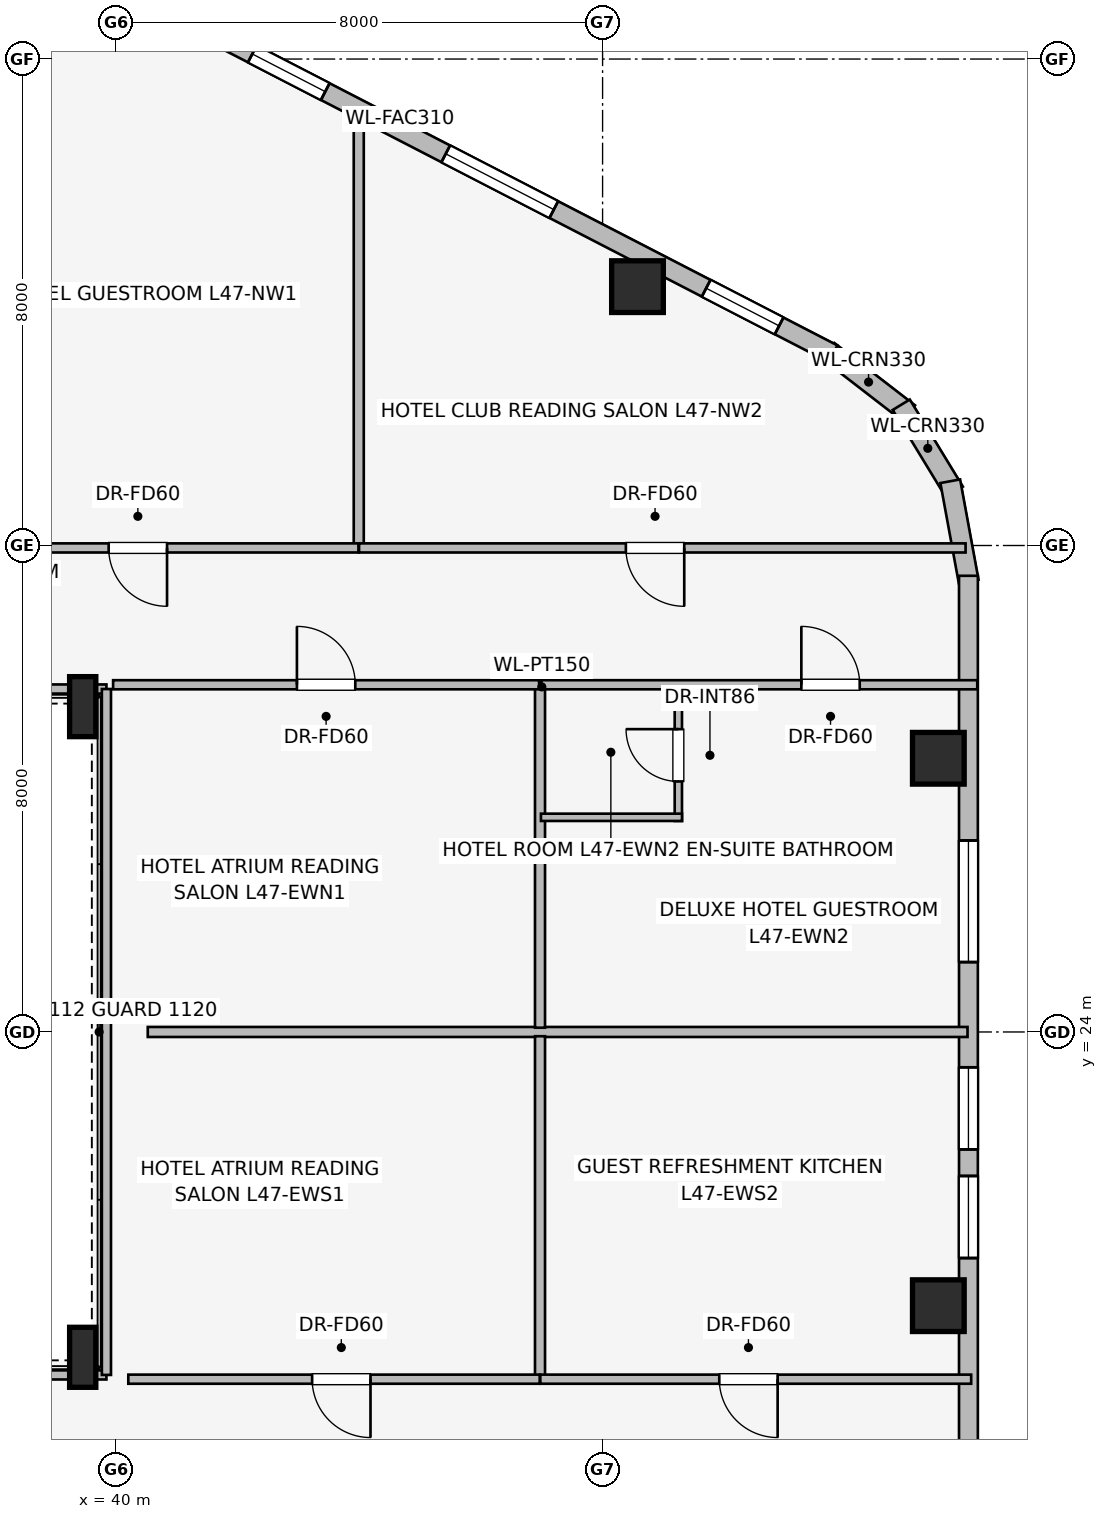
"""IFC4 building model, lengths in metres.
Left out: names, types, materials, properties, quantities, classifications, styles, units other than length and angle.
Written with IfcOpenShell. Run it as: python <this file> out.ifc"""

import sys

from ifc_helpers import new_model, si_unit, direction, frame, frame_2d, origin, origin_2d, place, context, subcontext, project, spatial, rectangle, i_section, extrude, element, fill, save


model = new_model("IFC4")
c1 = context("Model", 3, precision=1e-05, world=origin(), true_north=direction((0.0, 1.0)))
c2 = subcontext(c1, "Body", "Model", "MODEL_VIEW")
j1 = project(units=[si_unit("LENGTHUNIT", "METRE"), si_unit("PLANEANGLEUNIT", "RADIAN")], contexts=[c1])
p1 = place(None, origin())
s1 = spatial("IfcSite", under=j1, at=p1, CompositionType="ELEMENT")
p2 = place(p1, origin())
s2 = spatial("IfcBuilding", under=s1, at=p2, CompositionType="ELEMENT")
p3 = place(p2, frame((0.0, 0.0, 174.0)))
s3 = spatial("IfcBuildingStorey", under=s2, at=p3, CompositionType="ELEMENT", Elevation=174.0)
for number, where, z_axis, x_axis in (
    (1, (48.574, 36.257, 0.0), (0.0, 0.0, 1.0), (1.0, 0.0, 0.0)),
    (2, (53.522, 19.499, 0.0), (0.0, 0.0, 1.0), (1.0, 0.0, 0.0)),
    (3, (53.522, 28.501, 0.0), (0.0, 0.0, 1.0), (1.0, 0.0, 0.0)),
):
    element("IfcColumn", number, at=place(p3, frame(where, z_axis=z_axis, x_axis=x_axis)), inside=s3, PredefinedType="COLUMN", context=c2, shape_type="SweptSolid", body=[
        extrude(rectangle(XDim=0.85, YDim=0.85, at=origin_2d()), origin(), (0.0, 0.0, 1.0), 3.45),
    ])
for number, where, z_axis, x_axis in (
    (4, (39.45, 18.65, 0.0), (0.0, 0.0, 1.0), (1.0, 0.0, 0.0)),
    (5, (39.45, 29.35, 0.0), (0.0, 0.0, 1.0), (1.0, 0.0, 0.0)),
):
    element("IfcColumn", number, at=place(p3, frame(where, z_axis=z_axis, x_axis=x_axis)), inside=s3, PredefinedType="COLUMN", context=c2, shape_type="SweptSolid", body=[
        extrude(i_section(OverallWidth=0.431, OverallDepth=0.987, WebThickness=0.034, FlangeThickness=0.062, at=origin_2d()), origin(), (0.0, 0.0, 1.0), 3.45),
    ])
p4 = place(p3, frame((51.711, 35.2, 0.0), z_axis=(0.0, 0.0, 1.0), x_axis=(0.791464279355, -0.611215423976, 0.0)))
e6 = element("IfcWall", 6, at=p4, inside=s3, PredefinedType="STANDARD", context=c2, shape_type="SweptSolid", body=[
    extrude(rectangle(XDim=1.677, YDim=0.33, at=frame_2d((0.838, 0.0))), origin(), (0.0, 0.0, 1.0), 3.16),
])
p5 = place(p3, frame((52.912, 34.315, 0.0), z_axis=(0.0, 0.0, 1.0), x_axis=(0.520219286058, -0.85403272444, 0.0)))
e7 = element("IfcWall", 7, at=p5, inside=s3, PredefinedType="STANDARD", context=c2, shape_type="SweptSolid", body=[
    extrude(rectangle(XDim=1.678, YDim=0.33, at=frame_2d((0.839, 0.0))), origin(), (0.0, 0.0, 1.0), 3.16),
])
p6 = place(p3, frame((53.718, 33.057, 0.0), z_axis=(0.0, 0.0, 1.0), x_axis=(0.180717642671, -0.983535019014, 0.0)))
e8 = element("IfcWall", 8, at=p6, inside=s3, PredefinedType="STANDARD", context=c2, shape_type="SweptSolid", body=[
    extrude(rectangle(XDim=1.677, YDim=0.33, at=frame_2d((0.838, 0.0))), origin(), (0.0, 0.0, 1.0), 3.16),
])
p7 = place(p3, frame((36.838, 42.871, 0.0), z_axis=(0.0, 0.0, 1.0), x_axis=(0.888626188278, -0.458632202867, 0.0)))
e9 = element("IfcWall", 9, at=p7, inside=s3, PredefinedType="STANDARD", context=c2, shape_type="SweptSolid", body=[
    extrude(rectangle(XDim=16.828, YDim=0.31, at=frame_2d((8.414, 0.0))), origin(), (0.0, 0.0, 1.0), 3.16),
])
p8 = place(p7, frame((0.675, 0.0, 0.75)))
e10 = element("IfcOpeningElement", 10, at=p8, cuts=e9, PredefinedType="OPENING", context=c2, shape_type="SweptSolid", body=[
    extrude(rectangle(XDim=2.0, YDim=1.5, at=frame_2d((1.0, 0.75))), frame((0.0, 0.165, 0.0), z_axis=(0.0, -1.0, 0.0), x_axis=(1.0, 0.0, 0.0)), (0.0, 0.0, 1.0), 0.33),
])
p9 = place(p7, frame((4.196, 0.0, 0.75)))
e11 = element("IfcOpeningElement", 11, at=p9, cuts=e9, PredefinedType="OPENING", context=c2, shape_type="SweptSolid", body=[
    extrude(rectangle(XDim=1.35, YDim=1.45, at=frame_2d((0.675, 0.725))), frame((0.0, 0.165, 0.0), z_axis=(0.0, -1.0, 0.0), x_axis=(1.0, 0.0, 0.0)), (0.0, 0.0, 1.0), 0.33),
])
p10 = place(p7, frame((6.078, 0.0, 0.75)))
e12 = element("IfcOpeningElement", 12, at=p10, cuts=e9, PredefinedType="OPENING", context=c2, shape_type="SweptSolid", body=[
    extrude(rectangle(XDim=1.35, YDim=1.45, at=frame_2d((0.675, 0.725))), frame((0.0, 0.165, 0.0), z_axis=(0.0, -1.0, 0.0), x_axis=(1.0, 0.0, 0.0)), (0.0, 0.0, 1.0), 0.33),
])
p11 = place(p7, frame((9.658, 0.0, 0.75)))
e13 = element("IfcOpeningElement", 13, at=p11, cuts=e9, PredefinedType="OPENING", context=c2, shape_type="SweptSolid", body=[
    extrude(rectangle(XDim=2.0, YDim=1.5, at=frame_2d((1.0, 0.75))), frame((0.0, 0.165, 0.0), z_axis=(0.0, -1.0, 0.0), x_axis=(1.0, 0.0, 0.0)), (0.0, 0.0, 1.0), 0.33),
])
p12 = place(p7, frame((14.478, 0.0, 0.75)))
e14 = element("IfcOpeningElement", 14, at=p12, cuts=e9, PredefinedType="OPENING", context=c2, shape_type="SweptSolid", body=[
    extrude(rectangle(XDim=1.35, YDim=1.45, at=frame_2d((0.675, 0.725))), frame((0.0, 0.165, 0.0), z_axis=(0.0, -1.0, 0.0), x_axis=(1.0, 0.0, 0.0)), (0.0, 0.0, 1.0), 0.33),
])
p13 = place(p3, frame((54.017, 31.502, 0.0), z_axis=(0.0, 0.0, 1.0), x_axis=(0.0, -1.0, 0.0)))
e15 = element("IfcWall", 15, at=p13, inside=s3, PredefinedType="STANDARD", context=c2, shape_type="SweptSolid", body=[
    extrude(rectangle(XDim=15.004, YDim=0.31, at=frame_2d((7.502, 0.0))), origin(), (0.0, 0.0, 1.0), 3.16),
])
p14 = place(p13, frame((4.353, 0.0, 0.75)))
e16 = element("IfcOpeningElement", 16, at=p14, cuts=e15, PredefinedType="OPENING", context=c2, shape_type="SweptSolid", body=[
    extrude(rectangle(XDim=2.0, YDim=1.5, at=frame_2d((1.0, 0.75))), frame((0.0, 0.165, 0.0), z_axis=(0.0, -1.0, 0.0), x_axis=(1.0, 0.0, 0.0)), (0.0, 0.0, 1.0), 0.33),
])
p15 = place(p13, frame((8.083, 0.0, 0.75)))
e17 = element("IfcOpeningElement", 17, at=p15, cuts=e15, PredefinedType="OPENING", context=c2, shape_type="SweptSolid", body=[
    extrude(rectangle(XDim=1.35, YDim=1.45, at=frame_2d((0.675, 0.725))), frame((0.0, 0.165, 0.0), z_axis=(0.0, -1.0, 0.0), x_axis=(1.0, 0.0, 0.0)), (0.0, 0.0, 1.0), 0.33),
])
p16 = place(p13, frame((9.87, 0.0, 0.75)))
e18 = element("IfcOpeningElement", 18, at=p16, cuts=e15, PredefinedType="OPENING", context=c2, shape_type="SweptSolid", body=[
    extrude(rectangle(XDim=1.35, YDim=1.45, at=frame_2d((0.675, 0.725))), frame((0.0, 0.165, 0.0), z_axis=(0.0, -1.0, 0.0), x_axis=(1.0, 0.0, 0.0)), (0.0, 0.0, 1.0), 0.33),
])
p17 = place(p3, frame((27.675, 18.36, 0.0), z_axis=(0.0, 0.0, 1.0), x_axis=(1.0, 0.0, 0.0)))
e19 = element("IfcWall", 19, at=p17, inside=s3, PredefinedType="PARTITIONING", context=c2, shape_type="SweptSolid", body=[
    extrude(rectangle(XDim=12.165, YDim=0.15, at=frame_2d((6.083, 0.0))), origin(), (0.0, 0.0, 1.0), 2.301),
])
p18 = place(p3, frame((39.84, 29.64, 0.0), z_axis=(0.0, 0.0, 1.0), x_axis=(-1.0, 0.0, 0.0)))
e20 = element("IfcWall", 20, at=p18, inside=s3, PredefinedType="PARTITIONING", context=c2, shape_type="SweptSolid", body=[
    extrude(rectangle(XDim=12.2, YDim=0.15, at=frame_2d((6.1, 0.0))), origin(), (0.0, 0.0, 1.0), 2.301),
])
p19 = place(p3, frame((39.84, 18.36, 0.0), z_axis=(0.0, 0.0, 1.0), x_axis=(0.0, 1.0, 0.0)))
e21 = element("IfcWall", 21, at=p19, inside=s3, PredefinedType="PARTITIONING", context=c2, shape_type="SweptSolid", body=[
    extrude(rectangle(XDim=11.28, YDim=0.15, at=frame_2d((5.64, 0.0))), origin(), (0.0, 0.0, 1.0), 3.16),
])
p20 = place(p3, frame((43.99, 31.97, 0.0), z_axis=(0.0, 0.0, 1.0), x_axis=(0.0, 1.0, 0.0)))
e22 = element("IfcWall", 22, at=p20, inside=s3, PredefinedType="PARTITIONING", context=c2, shape_type="SweptSolid", body=[
    extrude(rectangle(XDim=7.193, YDim=0.165, at=frame_2d((3.597, 0.0))), origin(), (0.0, 0.0, 1.0), 3.16),
])
p21 = place(p3, frame((43.985, 31.96, 0.0), z_axis=(0.0, 0.0, 1.0), x_axis=(-1.0, 0.0, 0.0)))
e23 = element("IfcWall", 23, at=p21, inside=s3, PredefinedType="PARTITIONING", context=c2, shape_type="SweptSolid", body=[
    extrude(rectangle(XDim=9.695, YDim=0.15, at=frame_2d((4.848, 0.0))), origin(), (0.0, 0.0, 1.0), 3.16),
])
p22 = place(p21, frame((3.148, 0.0, 0.0)))
e24 = element("IfcOpeningElement", 24, at=p22, cuts=e23, PredefinedType="OPENING", context=c2, shape_type="SweptSolid", body=[
    extrude(rectangle(XDim=0.96, YDim=2.0, at=frame_2d((0.48, 1.0))), frame((0.0, 0.085, 0.0), z_axis=(0.0, -1.0, 0.0), x_axis=(1.0, 0.0, 0.0)), (0.0, 0.0, 1.0), 0.17),
])
p23 = place(p3, frame((53.97, 31.96, 0.0), z_axis=(0.0, 0.0, 1.0), x_axis=(-1.0, 0.0, 0.0)))
e25 = element("IfcWall", 25, at=p23, inside=s3, PredefinedType="PARTITIONING", context=c2, shape_type="SweptSolid", body=[
    extrude(rectangle(XDim=9.975, YDim=0.15, at=frame_2d((4.987, 0.0))), origin(), (0.0, 0.0, 1.0), 3.16),
])
p24 = place(p23, frame((4.627, 0.0, 0.0)))
e26 = element("IfcOpeningElement", 26, at=p24, cuts=e25, PredefinedType="OPENING", context=c2, shape_type="SweptSolid", body=[
    extrude(rectangle(XDim=0.96, YDim=2.0, at=frame_2d((0.48, 1.0))), frame((0.0, 0.085, 0.0), z_axis=(0.0, -1.0, 0.0), x_axis=(1.0, 0.0, 0.0)), (0.0, 0.0, 1.0), 0.17),
])
p25 = place(p3, frame((40.52, 24.0, 0.0), z_axis=(0.0, 0.0, 1.0), x_axis=(1.0, 0.0, 0.0)))
e27 = element("IfcWall", 27, at=p25, inside=s3, PredefinedType="PARTITIONING", context=c2, shape_type="SweptSolid", body=[
    extrude(rectangle(XDim=13.482, YDim=0.165, at=frame_2d((6.741, 0.0))), origin(), (0.0, 0.0, 1.0), 3.16),
])
p26 = place(p3, frame((46.971, 24.07, 0.0), z_axis=(0.0, 0.0, 1.0), x_axis=(0.0, 1.0, 0.0)))
e28 = element("IfcWall", 28, at=p26, inside=s3, PredefinedType="PARTITIONING", context=c2, shape_type="SweptSolid", body=[
    extrude(rectangle(XDim=5.64, YDim=0.165, at=frame_2d((2.82, 0.0))), origin(), (0.0, 0.0, 1.0), 2.703),
])
p27 = place(p3, frame((39.95, 29.71, 0.0), z_axis=(0.0, 0.0, 1.0), x_axis=(1.0, 0.0, 0.0)))
e29 = element("IfcWall", 29, at=p27, inside=s3, PredefinedType="PARTITIONING", context=c2, shape_type="SweptSolid", body=[
    extrude(rectangle(XDim=7.006, YDim=0.15, at=frame_2d((3.503, 0.0))), origin(), (0.0, 0.0, 1.0), 3.16),
])
p28 = place(p27, frame((3.023, 0.0, 0.0)))
e30 = element("IfcOpeningElement", 30, at=p28, cuts=e29, PredefinedType="OPENING", context=c2, shape_type="SweptSolid", body=[
    extrude(rectangle(XDim=0.96, YDim=2.0, at=frame_2d((0.48, 1.0))), frame((0.0, 0.085, 0.0), z_axis=(0.0, -1.0, 0.0), x_axis=(1.0, 0.0, 0.0)), (0.0, 0.0, 1.0), 0.17),
])
p29 = place(p3, frame((49.246, 27.47, 0.0), z_axis=(0.0, 0.0, 1.0), x_axis=(0.0, 1.0, 0.0)))
e31 = element("IfcWall", 31, at=p29, inside=s3, PredefinedType="PARTITIONING", context=c2, shape_type="SweptSolid", body=[
    extrude(rectangle(XDim=2.24, YDim=0.12, at=frame_2d((1.12, 0.0))), origin(), (0.0, 0.0, 1.0), 3.16),
])
p30 = place(p29, frame((0.65, 0.0, 0.0)))
e32 = element("IfcOpeningElement", 32, at=p30, cuts=e31, PredefinedType="OPENING", context=c2, shape_type="SweptSolid", body=[
    extrude(rectangle(XDim=0.86, YDim=2.0, at=frame_2d((0.43, 1.0))), frame((0.0, 0.07, 0.0), z_axis=(0.0, -1.0, 0.0), x_axis=(1.0, 0.0, 0.0)), (0.0, 0.0, 1.0), 0.14),
])
p31 = place(p3, frame((46.986, 27.53, 0.0), z_axis=(0.0, 0.0, 1.0), x_axis=(1.0, 0.0, 0.0)))
e33 = element("IfcWall", 33, at=p31, inside=s3, PredefinedType="PARTITIONING", context=c2, shape_type="SweptSolid", body=[
    extrude(rectangle(XDim=2.32, YDim=0.12, at=frame_2d((1.16, 0.0))), origin(), (0.0, 0.0, 1.0), 3.16),
])
p32 = place(p3, frame((46.986, 29.71, 0.0), z_axis=(0.0, 0.0, 1.0), x_axis=(1.0, 0.0, 0.0)))
e34 = element("IfcWall", 34, at=p32, inside=s3, PredefinedType="PARTITIONING", context=c2, shape_type="SweptSolid", body=[
    extrude(rectangle(XDim=7.176, YDim=0.15, at=frame_2d((3.588, 0.0))), origin(), (0.0, 0.0, 1.0), 3.16),
])
p33 = place(p32, frame((4.283, 0.0, 0.0)))
e35 = element("IfcOpeningElement", 35, at=p33, cuts=e34, PredefinedType="OPENING", context=c2, shape_type="SweptSolid", body=[
    extrude(rectangle(XDim=0.96, YDim=2.0, at=frame_2d((0.48, 1.0))), frame((0.0, 0.085, 0.0), z_axis=(0.0, -1.0, 0.0), x_axis=(1.0, 0.0, 0.0)), (0.0, 0.0, 1.0), 0.17),
])
p34 = place(p3, frame((46.971, 18.29, 0.0), z_axis=(0.0, 0.0, 1.0), x_axis=(0.0, 1.0, 0.0)))
e36 = element("IfcWall", 36, at=p34, inside=s3, PredefinedType="PARTITIONING", context=c2, shape_type="SweptSolid", body=[
    extrude(rectangle(XDim=5.64, YDim=0.165, at=frame_2d((2.82, 0.0))), origin(), (0.0, 0.0, 1.0), 2.703),
])
p35 = place(p3, frame((46.966, 18.29, 0.0), z_axis=(0.0, 0.0, 1.0), x_axis=(-1.0, 0.0, 0.0)))
e37 = element("IfcWall", 37, at=p35, inside=s3, PredefinedType="PARTITIONING", context=c2, shape_type="SweptSolid", body=[
    extrude(rectangle(XDim=6.766, YDim=0.15, at=frame_2d((3.383, 0.0))), origin(), (0.0, 0.0, 1.0), 3.16),
])
p36 = place(p35, frame((2.783, 0.0, 0.0)))
e38 = element("IfcOpeningElement", 38, at=p36, cuts=e37, PredefinedType="OPENING", context=c2, shape_type="SweptSolid", body=[
    extrude(rectangle(XDim=0.96, YDim=2.0, at=frame_2d((0.48, 1.0))), frame((0.0, 0.085, 0.0), z_axis=(0.0, -1.0, 0.0), x_axis=(1.0, 0.0, 0.0)), (0.0, 0.0, 1.0), 0.17),
])
p37 = place(p3, frame((54.062, 18.29, 0.0), z_axis=(0.0, 0.0, 1.0), x_axis=(-1.0, 0.0, 0.0)))
e39 = element("IfcWall", 39, at=p37, inside=s3, PredefinedType="PARTITIONING", context=c2, shape_type="SweptSolid", body=[
    extrude(rectangle(XDim=7.086, YDim=0.15, at=frame_2d((3.543, 0.0))), origin(), (0.0, 0.0, 1.0), 3.16),
])
p38 = place(p37, frame((3.183, 0.0, 0.0)))
e40 = element("IfcOpeningElement", 40, at=p38, cuts=e39, PredefinedType="OPENING", context=c2, shape_type="SweptSolid", body=[
    extrude(rectangle(XDim=0.96, YDim=2.0, at=frame_2d((0.48, 1.0))), frame((0.0, 0.085, 0.0), z_axis=(0.0, -1.0, 0.0), x_axis=(1.0, 0.0, 0.0)), (0.0, 0.0, 1.0), 0.17),
])
p39 = place(p10, origin())
e41 = element("IfcWindow", 41, at=p39, inside=s3, PartitioningType="SINGLE_PANEL", PredefinedType="WINDOW", context=c2, shape_type="SweptSolid", body=[
    extrude(rectangle(XDim=1.35, YDim=1.45, at=frame_2d((0.675, 0.725))), frame((0.0, 0.03, 0.0), z_axis=(0.0, -1.0, 0.0), x_axis=(1.0, 0.0, 0.0)), (0.0, 0.0, 1.0), 0.06),
])
fill(e12, e41)
p40 = place(p11, origin())
e42 = element("IfcWindow", 42, at=p40, inside=s3, PartitioningType="SINGLE_PANEL", PredefinedType="WINDOW", context=c2, shape_type="SweptSolid", body=[
    extrude(rectangle(XDim=2.0, YDim=1.5, at=frame_2d((1.0, 0.75))), frame((0.0, 0.03, 0.0), z_axis=(0.0, -1.0, 0.0), x_axis=(1.0, 0.0, 0.0)), (0.0, 0.0, 1.0), 0.06),
])
fill(e13, e42)
p41 = place(p12, origin())
e43 = element("IfcWindow", 43, at=p41, inside=s3, PartitioningType="SINGLE_PANEL", PredefinedType="WINDOW", context=c2, shape_type="SweptSolid", body=[
    extrude(rectangle(XDim=1.35, YDim=1.45, at=frame_2d((0.675, 0.725))), frame((0.0, 0.03, 0.0), z_axis=(0.0, -1.0, 0.0), x_axis=(1.0, 0.0, 0.0)), (0.0, 0.0, 1.0), 0.06),
])
fill(e14, e43)
p42 = place(p14, origin())
e44 = element("IfcWindow", 44, at=p42, inside=s3, PartitioningType="SINGLE_PANEL", PredefinedType="WINDOW", context=c2, shape_type="SweptSolid", body=[
    extrude(rectangle(XDim=2.0, YDim=1.5, at=frame_2d((1.0, 0.75))), frame((0.0, 0.03, 0.0), z_axis=(0.0, -1.0, 0.0), x_axis=(1.0, 0.0, 0.0)), (0.0, 0.0, 1.0), 0.06),
])
fill(e16, e44)
p43 = place(p15, origin())
e45 = element("IfcWindow", 45, at=p43, inside=s3, PartitioningType="SINGLE_PANEL", PredefinedType="WINDOW", context=c2, shape_type="SweptSolid", body=[
    extrude(rectangle(XDim=1.35, YDim=1.45, at=frame_2d((0.675, 0.725))), frame((0.0, 0.03, 0.0), z_axis=(0.0, -1.0, 0.0), x_axis=(1.0, 0.0, 0.0)), (0.0, 0.0, 1.0), 0.06),
])
fill(e17, e45)
p44 = place(p16, origin())
e46 = element("IfcWindow", 46, at=p44, inside=s3, PartitioningType="SINGLE_PANEL", PredefinedType="WINDOW", context=c2, shape_type="SweptSolid", body=[
    extrude(rectangle(XDim=1.35, YDim=1.45, at=frame_2d((0.675, 0.725))), frame((0.0, 0.03, 0.0), z_axis=(0.0, -1.0, 0.0), x_axis=(1.0, 0.0, 0.0)), (0.0, 0.0, 1.0), 0.06),
])
fill(e18, e46)
p45 = place(p22, origin())
e47 = element("IfcDoor", 47, at=p45, inside=s3, OperationType="SINGLE_SWING_LEFT", PredefinedType="DOOR", context=c2, shape_type="SweptSolid", body=[
    extrude(rectangle(XDim=0.96, YDim=2.0, at=frame_2d((0.48, 1.0))), frame((0.0, 0.025, 0.0), z_axis=(0.0, -1.0, 0.0), x_axis=(1.0, 0.0, 0.0)), (0.0, 0.0, 1.0), 0.05),
])
fill(e24, e47)
p46 = place(p24, origin())
e48 = element("IfcDoor", 48, at=p46, inside=s3, OperationType="SINGLE_SWING_LEFT", PredefinedType="DOOR", context=c2, shape_type="SweptSolid", body=[
    extrude(rectangle(XDim=0.96, YDim=2.0, at=frame_2d((0.48, 1.0))), frame((0.0, 0.025, 0.0), z_axis=(0.0, -1.0, 0.0), x_axis=(1.0, 0.0, 0.0)), (0.0, 0.0, 1.0), 0.05),
])
fill(e26, e48)
p47 = place(p28, origin())
e49 = element("IfcDoor", 49, at=p47, inside=s3, OperationType="SINGLE_SWING_LEFT", PredefinedType="DOOR", context=c2, shape_type="SweptSolid", body=[
    extrude(rectangle(XDim=0.96, YDim=2.0, at=frame_2d((0.48, 1.0))), frame((0.0, 0.025, 0.0), z_axis=(0.0, -1.0, 0.0), x_axis=(1.0, 0.0, 0.0)), (0.0, 0.0, 1.0), 0.05),
])
fill(e30, e49)
p48 = place(p30, origin())
e50 = element("IfcDoor", 50, at=p48, inside=s3, OperationType="SINGLE_SWING_RIGHT", PredefinedType="DOOR", context=c2, shape_type="SweptSolid", body=[
    extrude(rectangle(XDim=0.86, YDim=2.0, at=frame_2d((0.43, 1.0))), frame((0.0, 0.025, 0.0), z_axis=(0.0, -1.0, 0.0), x_axis=(1.0, 0.0, 0.0)), (0.0, 0.0, 1.0), 0.05),
])
fill(e32, e50)
p49 = place(p33, origin())
e51 = element("IfcDoor", 51, at=p49, inside=s3, OperationType="SINGLE_SWING_LEFT", PredefinedType="DOOR", context=c2, shape_type="SweptSolid", body=[
    extrude(rectangle(XDim=0.96, YDim=2.0, at=frame_2d((0.48, 1.0))), frame((0.0, 0.025, 0.0), z_axis=(0.0, -1.0, 0.0), x_axis=(1.0, 0.0, 0.0)), (0.0, 0.0, 1.0), 0.05),
])
fill(e35, e51)
p50 = place(p36, origin())
e52 = element("IfcDoor", 52, at=p50, inside=s3, OperationType="SINGLE_SWING_LEFT", PredefinedType="DOOR", context=c2, shape_type="SweptSolid", body=[
    extrude(rectangle(XDim=0.96, YDim=2.0, at=frame_2d((0.48, 1.0))), frame((0.0, 0.025, 0.0), z_axis=(0.0, -1.0, 0.0), x_axis=(1.0, 0.0, 0.0)), (0.0, 0.0, 1.0), 0.05),
])
fill(e38, e52)
p51 = place(p38, origin())
e53 = element("IfcDoor", 53, at=p51, inside=s3, OperationType="SINGLE_SWING_LEFT", PredefinedType="DOOR", context=c2, shape_type="SweptSolid", body=[
    extrude(rectangle(XDim=0.96, YDim=2.0, at=frame_2d((0.48, 1.0))), frame((0.0, 0.025, 0.0), z_axis=(0.0, -1.0, 0.0), x_axis=(1.0, 0.0, 0.0)), (0.0, 0.0, 1.0), 0.05),
])
fill(e40, e53)
save(model, sys.argv[1])
